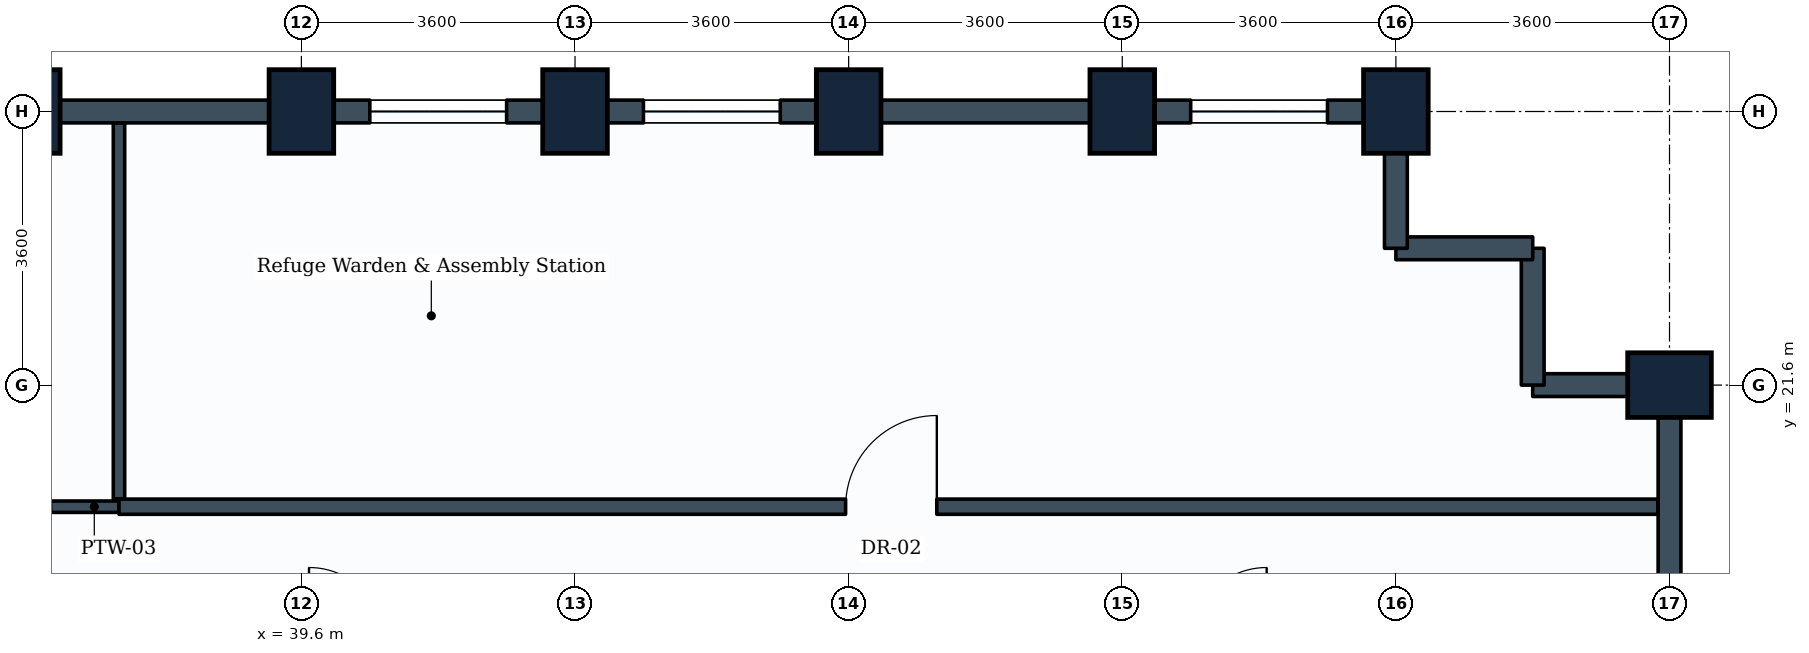
"""IFC4 building model, lengths in metres.
Left out: names, types, materials, properties, quantities, classifications, styles, units other than length and angle.
Written with IfcOpenShell. Run it as: python <this file> out.ifc"""

import sys

from ifc_helpers import new_model, si_unit, direction, frame, frame_2d, origin, origin_2d, place, context, subcontext, project, spatial, rectangle, extrude, element, fill, save


model = new_model("IFC4")
c1 = context("Model", 3, precision=1e-05, world=origin(), true_north=direction((0.0, 1.0)))
c2 = subcontext(c1, "Body", "Model", "MODEL_VIEW")
j1 = project(units=[si_unit("LENGTHUNIT", "METRE"), si_unit("PLANEANGLEUNIT", "RADIAN")], contexts=[c1])
p1 = place(None, origin())
s1 = spatial("IfcSite", under=j1, at=p1, CompositionType="ELEMENT")
p2 = place(p1, origin())
s2 = spatial("IfcBuilding", under=s1, at=p2, CompositionType="ELEMENT")
p3 = place(p2, frame((0.0, 0.0, 120.0)))
s3 = spatial("IfcBuildingStorey", under=s2, at=p3, CompositionType="ELEMENT", Elevation=120.0)
for number, where, z_axis, x_axis in (
    (1, (36.0, 25.2, 0.0), (0.0, 0.0, 1.0), (1.0, 0.0, 0.0)),
    (2, (39.6, 25.2, 0.0), (0.0, 0.0, 1.0), (1.0, 0.0, 0.0)),
    (3, (43.2, 25.2, 0.0), (0.0, 0.0, 1.0), (1.0, 0.0, 0.0)),
    (4, (46.8, 25.2, 0.0), (0.0, 0.0, 1.0), (1.0, 0.0, 0.0)),
    (5, (50.4, 25.2, 0.0), (0.0, 0.0, 1.0), (1.0, 0.0, 0.0)),
    (6, (54.0, 25.2, 0.0), (0.0, 0.0, 1.0), (1.0, 0.0, 0.0)),
    (7, (57.6, 21.6, 0.0), (0.0, 0.0, 1.0), (0.0, 1.0, 0.0)),
):
    element("IfcColumn", number, at=place(p3, frame(where, z_axis=z_axis, x_axis=x_axis)), inside=s3, PredefinedType="COLUMN", context=c2, shape_type="SweptSolid", body=[
        extrude(rectangle(XDim=0.85, YDim=1.1, at=origin_2d()), origin(), (0.0, 0.0, 1.0), 3.8),
    ])
p4 = place(p3, frame((57.6, 21.6, 0.0), z_axis=(0.0, 0.0, 1.0), x_axis=(0.0, -1.0, 0.0)))
e8 = element("IfcWall", 8, at=p4, inside=s3, PredefinedType="STANDARD", context=c2, shape_type="SweptSolid", body=[
    extrude(rectangle(XDim=3.6, YDim=0.3, at=frame_2d((1.8, 0.0))), origin(), (0.0, 0.0, 1.0), 2.93),
])
p5 = place(p3, frame((55.8, 21.6, 0.0), z_axis=(0.0, 0.0, 1.0), x_axis=(1.0, 0.0, 0.0)))
e9 = element("IfcWall", 9, at=p5, inside=s3, PredefinedType="STANDARD", context=c2, shape_type="SweptSolid", body=[
    extrude(rectangle(XDim=1.8, YDim=0.3, at=frame_2d((0.9, 0.0))), origin(), (0.0, 0.0, 1.0), 2.93),
])
p6 = place(p3, frame((55.8, 23.4, 0.0), z_axis=(0.0, 0.0, 1.0), x_axis=(0.0, -1.0, 0.0)))
e10 = element("IfcWall", 10, at=p6, inside=s3, PredefinedType="STANDARD", context=c2, shape_type="SweptSolid", body=[
    extrude(rectangle(XDim=1.8, YDim=0.3, at=frame_2d((0.9, 0.0))), origin(), (0.0, 0.0, 1.0), 3.535),
])
p7 = place(p3, frame((54.0, 23.4, 0.0), z_axis=(0.0, 0.0, 1.0), x_axis=(1.0, 0.0, 0.0)))
e11 = element("IfcWall", 11, at=p7, inside=s3, PredefinedType="STANDARD", context=c2, shape_type="SweptSolid", body=[
    extrude(rectangle(XDim=1.8, YDim=0.3, at=frame_2d((0.9, 0.0))), origin(), (0.0, 0.0, 1.0), 3.535),
])
p8 = place(p3, frame((54.0, 25.2, 0.0), z_axis=(0.0, 0.0, 1.0), x_axis=(0.0, -1.0, 0.0)))
e12 = element("IfcWall", 12, at=p8, inside=s3, PredefinedType="STANDARD", context=c2, shape_type="SweptSolid", body=[
    extrude(rectangle(XDim=1.8, YDim=0.3, at=frame_2d((0.9, 0.0))), origin(), (0.0, 0.0, 1.0), 2.93),
])
p9 = place(p3, frame((50.4, 25.2, 0.0), z_axis=(0.0, 0.0, 1.0), x_axis=(1.0, 0.0, 0.0)))
e13 = element("IfcWall", 13, at=p9, inside=s3, PredefinedType="STANDARD", context=c2, shape_type="SweptSolid", body=[
    extrude(rectangle(XDim=3.6, YDim=0.3, at=frame_2d((1.8, 0.0))), origin(), (0.0, 0.0, 1.0), 2.93),
])
p10 = place(p9, frame((0.9, 0.0, 0.85)))
e14 = element("IfcOpeningElement", 14, at=p10, cuts=e13, PredefinedType="OPENING", context=c2, shape_type="SweptSolid", body=[
    extrude(rectangle(XDim=1.8, YDim=1.35, at=frame_2d((0.9, 0.675))), frame((0.0, 0.16, 0.0), z_axis=(0.0, -1.0, 0.0), x_axis=(1.0, 0.0, 0.0)), (0.0, 0.0, 1.0), 0.32),
])
p11 = place(p3, frame((46.8, 25.2, 0.0), z_axis=(0.0, 0.0, 1.0), x_axis=(1.0, 0.0, 0.0)))
e15 = element("IfcWall", 15, at=p11, inside=s3, PredefinedType="STANDARD", context=c2, shape_type="SweptSolid", body=[
    extrude(rectangle(XDim=3.6, YDim=0.3, at=frame_2d((1.8, 0.0))), origin(), (0.0, 0.0, 1.0), 2.93),
])
p12 = place(p3, frame((43.2, 25.2, 0.0), z_axis=(0.0, 0.0, 1.0), x_axis=(1.0, 0.0, 0.0)))
e16 = element("IfcWall", 16, at=p12, inside=s3, PredefinedType="STANDARD", context=c2, shape_type="SweptSolid", body=[
    extrude(rectangle(XDim=3.6, YDim=0.3, at=frame_2d((1.8, 0.0))), origin(), (0.0, 0.0, 1.0), 2.93),
])
p13 = place(p12, frame((0.9, 0.0, 0.85)))
e17 = element("IfcOpeningElement", 17, at=p13, cuts=e16, PredefinedType="OPENING", context=c2, shape_type="SweptSolid", body=[
    extrude(rectangle(XDim=1.8, YDim=1.35, at=frame_2d((0.9, 0.675))), frame((0.0, 0.16, 0.0), z_axis=(0.0, -1.0, 0.0), x_axis=(1.0, 0.0, 0.0)), (0.0, 0.0, 1.0), 0.32),
])
p14 = place(p3, frame((39.6, 25.2, 0.0), z_axis=(0.0, 0.0, 1.0), x_axis=(1.0, 0.0, 0.0)))
e18 = element("IfcWall", 18, at=p14, inside=s3, PredefinedType="STANDARD", context=c2, shape_type="SweptSolid", body=[
    extrude(rectangle(XDim=3.6, YDim=0.3, at=frame_2d((1.8, 0.0))), origin(), (0.0, 0.0, 1.0), 2.93),
])
p15 = place(p14, frame((0.9, 0.0, 0.85)))
e19 = element("IfcOpeningElement", 19, at=p15, cuts=e18, PredefinedType="OPENING", context=c2, shape_type="SweptSolid", body=[
    extrude(rectangle(XDim=1.8, YDim=1.35, at=frame_2d((0.9, 0.675))), frame((0.0, 0.16, 0.0), z_axis=(0.0, -1.0, 0.0), x_axis=(1.0, 0.0, 0.0)), (0.0, 0.0, 1.0), 0.32),
])
p16 = place(p3, frame((36.0, 25.2, 0.0), z_axis=(0.0, 0.0, 1.0), x_axis=(1.0, 0.0, 0.0)))
e20 = element("IfcWall", 20, at=p16, inside=s3, PredefinedType="STANDARD", context=c2, shape_type="SweptSolid", body=[
    extrude(rectangle(XDim=3.6, YDim=0.3, at=frame_2d((1.8, 0.0))), origin(), (0.0, 0.0, 1.0), 2.93),
])
p17 = place(p3, frame((34.4, 20.0, 0.0), z_axis=(0.0, 0.0, 1.0), x_axis=(1.0, 0.0, 0.0)))
e21 = element("IfcWall", 21, at=p17, inside=s3, PredefinedType="PARTITIONING", context=c2, shape_type="SweptSolid", body=[
    extrude(rectangle(XDim=2.8, YDim=0.15, at=frame_2d((1.4, 0.0))), origin(), (0.0, 0.0, 1.0), 3.08),
])
p18 = place(p17, frame((0.9, 0.0, 0.0)))
e22 = element("IfcOpeningElement", 22, at=p18, cuts=e21, PredefinedType="OPENING", context=c2, shape_type="SweptSolid", body=[
    extrude(rectangle(XDim=1.0, YDim=2.1, at=frame_2d((0.5, 1.05))), frame((0.0, 0.085, 0.0), z_axis=(0.0, -1.0, 0.0), x_axis=(1.0, 0.0, 0.0)), (0.0, 0.0, 1.0), 0.17),
])
p19 = place(p3, frame((37.2, 20.0, 0.0), z_axis=(0.0, 0.0, 1.0), x_axis=(1.0, 0.0, 0.0)))
e23 = element("IfcWall", 23, at=p19, inside=s3, PredefinedType="PARTITIONING", context=c2, shape_type="SweptSolid", body=[
    extrude(rectangle(XDim=20.246, YDim=0.2, at=frame_2d((10.123, 0.0))), origin(), (0.0, 0.0, 1.0), 2.93),
])
p20 = place(p19, frame((9.56, 0.0, 0.0)))
e24 = element("IfcOpeningElement", 24, at=p20, cuts=e23, PredefinedType="OPENING", context=c2, shape_type="SweptSolid", body=[
    extrude(rectangle(XDim=1.2, YDim=2.1, at=frame_2d((0.6, 1.05))), frame((0.0, 0.11, 0.0), z_axis=(0.0, -1.0, 0.0), x_axis=(1.0, 0.0, 0.0)), (0.0, 0.0, 1.0), 0.22),
])
p21 = place(p3, frame((37.2, 20.104, 0.0), z_axis=(0.0, 0.0, 1.0), x_axis=(0.0, 1.0, 0.0)))
e25 = element("IfcWall", 25, at=p21, inside=s3, PredefinedType="PARTITIONING", context=c2, shape_type="SweptSolid", body=[
    extrude(rectangle(XDim=4.942, YDim=0.15, at=frame_2d((2.471, 0.0))), origin(), (0.0, 0.0, 1.0), 2.93),
])
p22 = place(p10, origin())
e26 = element("IfcWindow", 26, at=p22, inside=s3, PartitioningType="SINGLE_PANEL", PredefinedType="WINDOW", context=c2, shape_type="SweptSolid", body=[
    extrude(rectangle(XDim=1.8, YDim=1.35, at=frame_2d((0.9, 0.675))), frame((0.0, 0.03, 0.0), z_axis=(0.0, -1.0, 0.0), x_axis=(1.0, 0.0, 0.0)), (0.0, 0.0, 1.0), 0.06),
])
fill(e14, e26)
p23 = place(p13, origin())
e27 = element("IfcWindow", 27, at=p23, inside=s3, PartitioningType="SINGLE_PANEL", PredefinedType="WINDOW", context=c2, shape_type="SweptSolid", body=[
    extrude(rectangle(XDim=1.8, YDim=1.35, at=frame_2d((0.9, 0.675))), frame((0.0, 0.03, 0.0), z_axis=(0.0, -1.0, 0.0), x_axis=(1.0, 0.0, 0.0)), (0.0, 0.0, 1.0), 0.06),
])
fill(e17, e27)
p24 = place(p15, origin())
e28 = element("IfcWindow", 28, at=p24, inside=s3, PartitioningType="SINGLE_PANEL", PredefinedType="WINDOW", context=c2, shape_type="SweptSolid", body=[
    extrude(rectangle(XDim=1.8, YDim=1.35, at=frame_2d((0.9, 0.675))), frame((0.0, 0.03, 0.0), z_axis=(0.0, -1.0, 0.0), x_axis=(1.0, 0.0, 0.0)), (0.0, 0.0, 1.0), 0.06),
])
fill(e19, e28)
p25 = place(p20, origin())
e29 = element("IfcDoor", 29, at=p25, inside=s3, OperationType="SINGLE_SWING_RIGHT", PredefinedType="DOOR", context=c2, shape_type="SweptSolid", body=[
    extrude(rectangle(XDim=1.2, YDim=2.1, at=frame_2d((0.6, 1.05))), frame((0.0, 0.025, 0.0), z_axis=(0.0, -1.0, 0.0), x_axis=(1.0, 0.0, 0.0)), (0.0, 0.0, 1.0), 0.05),
])
fill(e24, e29)
save(model, sys.argv[1])
